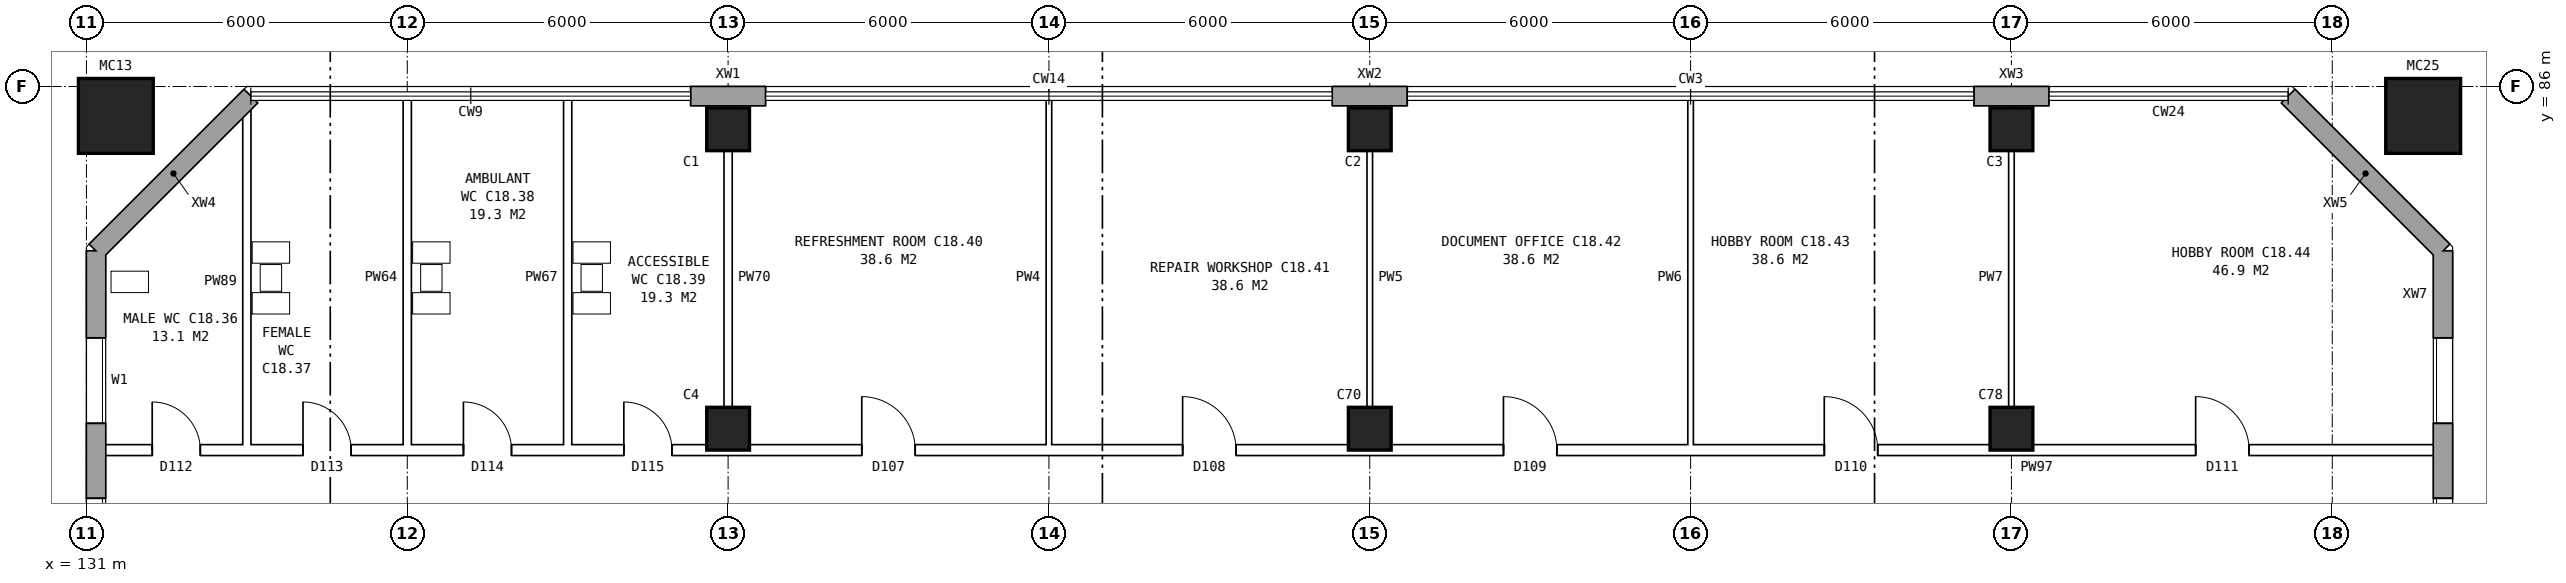
"""IFC4 building model, lengths in metres.
Left out: names, types, materials, properties, quantities, classifications, styles, units other than length and angle.
Written with IfcOpenShell. Run it as: python <this file> out.ifc"""

import sys

from ifc_helpers import new_model, si_unit, direction, frame, frame_2d, origin, origin_2d, place, context, subcontext, project, spatial, rectangle, hollow_rectangle, extrude, element, fill, save


model = new_model("IFC4")
c1 = context("Model", 3, precision=1e-05, world=origin(), true_north=direction((0.0, 1.0)))
c2 = subcontext(c1, "Body", "Model", "MODEL_VIEW")
j1 = project(units=[si_unit("LENGTHUNIT", "METRE"), si_unit("PLANEANGLEUNIT", "RADIAN")], contexts=[c1])
p1 = place(None, origin())
s1 = spatial("IfcSite", under=j1, at=p1, CompositionType="ELEMENT")
p2 = place(p1, origin())
s2 = spatial("IfcBuilding", under=s1, at=p2, CompositionType="ELEMENT")
p3 = place(p2, frame((0.0, 0.0, 67.4)))
s3 = spatial("IfcBuildingStorey", under=s2, at=p3, CompositionType="ELEMENT", Elevation=67.4)
for number, where, z_axis, x_axis in (
    (1, (143.0, 79.6, 0.0), (0.0, 0.0, 1.0), (1.0, 0.0, 0.0)),
    (2, (143.0, 85.2, 0.0), (0.0, 0.0, 1.0), (1.0, 0.0, 0.0)),
    (3, (155.0, 79.6, 0.0), (0.0, 0.0, 1.0), (1.0, 0.0, 0.0)),
    (4, (155.0, 85.2, 0.0), (0.0, 0.0, 1.0), (1.0, 0.0, 0.0)),
    (5, (167.0, 79.6, 0.0), (0.0, 0.0, 1.0), (1.0, 0.0, 0.0)),
    (6, (167.0, 85.2, 0.0), (0.0, 0.0, 1.0), (1.0, 0.0, 0.0)),
):
    element("IfcColumn", number, at=place(p3, frame(where, z_axis=z_axis, x_axis=x_axis)), inside=s3, PredefinedType="COLUMN", context=c2, shape_type="SweptSolid", body=[
        extrude(rectangle(XDim=0.8, YDim=0.8, at=origin_2d()), origin(), (0.0, 0.0, 1.0), 3.6),
    ])
for number, where, z_axis, x_axis in (
    (7, (174.7, 85.45, 0.0), (0.0, 0.0, 1.0), (1.0, 0.0, 0.0)),
    (8, (131.55, 85.45, 0.0), (0.0, 0.0, 1.0), (1.0, 0.0, 0.0)),
):
    element("IfcColumn", number, at=place(p3, frame(where, z_axis=z_axis, x_axis=x_axis)), inside=s3, PredefinedType="COLUMN", context=c2, shape_type="SweptSolid", body=[
        extrude(hollow_rectangle(XDim=1.4, YDim=1.4, WallThickness=0.075, at=origin_2d()), origin(), (0.0, 0.0, 1.0), 4.2),
    ])
p4 = place(p3, frame((175.07, 57.075, 0.0), z_axis=(0.0, 0.0, 1.0), x_axis=(0.0, 1.0, 0.0)))
e9 = element("IfcWall", 9, at=p4, inside=s3, PredefinedType="STANDARD", context=c2, shape_type="SweptSolid", body=[
    extrude(rectangle(XDim=25.851, YDim=0.36, at=frame_2d((12.925, 0.0))), origin(), (0.0, 0.0, 1.0), 3.6),
])
p5 = place(p4, frame((1.625, 0.0, 0.8)))
e10 = element("IfcOpeningElement", 10, at=p5, cuts=e9, PredefinedType="OPENING", context=c2, shape_type="SweptSolid", body=[
    extrude(rectangle(XDim=1.6, YDim=1.8, at=frame_2d((0.8, 0.9))), frame((0.0, 0.19, 0.0), z_axis=(0.0, -1.0, 0.0), x_axis=(1.0, 0.0, 0.0)), (0.0, 0.0, 1.0), 0.38),
])
p6 = place(p4, frame((4.625, 0.0, 0.8)))
e11 = element("IfcOpeningElement", 11, at=p6, cuts=e9, PredefinedType="OPENING", context=c2, shape_type="SweptSolid", body=[
    extrude(rectangle(XDim=1.6, YDim=1.8, at=frame_2d((0.8, 0.9))), frame((0.0, 0.19, 0.0), z_axis=(0.0, -1.0, 0.0), x_axis=(1.0, 0.0, 0.0)), (0.0, 0.0, 1.0), 0.38),
])
p7 = place(p4, frame((7.625, 0.0, 0.8)))
e12 = element("IfcOpeningElement", 12, at=p7, cuts=e9, PredefinedType="OPENING", context=c2, shape_type="SweptSolid", body=[
    extrude(rectangle(XDim=1.6, YDim=1.8, at=frame_2d((0.8, 0.9))), frame((0.0, 0.19, 0.0), z_axis=(0.0, -1.0, 0.0), x_axis=(1.0, 0.0, 0.0)), (0.0, 0.0, 1.0), 0.38),
])
p8 = place(p4, frame((10.625, 0.0, 0.8)))
e13 = element("IfcOpeningElement", 13, at=p8, cuts=e9, PredefinedType="OPENING", context=c2, shape_type="SweptSolid", body=[
    extrude(rectangle(XDim=1.6, YDim=1.8, at=frame_2d((0.8, 0.9))), frame((0.0, 0.19, 0.0), z_axis=(0.0, -1.0, 0.0), x_axis=(1.0, 0.0, 0.0)), (0.0, 0.0, 1.0), 0.38),
])
p9 = place(p4, frame((13.625, 0.0, 0.8)))
e14 = element("IfcOpeningElement", 14, at=p9, cuts=e9, PredefinedType="OPENING", context=c2, shape_type="SweptSolid", body=[
    extrude(rectangle(XDim=1.6, YDim=1.8, at=frame_2d((0.8, 0.9))), frame((0.0, 0.19, 0.0), z_axis=(0.0, -1.0, 0.0), x_axis=(1.0, 0.0, 0.0)), (0.0, 0.0, 1.0), 0.38),
])
p10 = place(p4, frame((16.625, 0.0, 0.8)))
e15 = element("IfcOpeningElement", 15, at=p10, cuts=e9, PredefinedType="OPENING", context=c2, shape_type="SweptSolid", body=[
    extrude(rectangle(XDim=1.6, YDim=1.8, at=frame_2d((0.8, 0.9))), frame((0.0, 0.19, 0.0), z_axis=(0.0, -1.0, 0.0), x_axis=(1.0, 0.0, 0.0)), (0.0, 0.0, 1.0), 0.38),
])
p11 = place(p4, frame((19.625, 0.0, 0.8)))
e16 = element("IfcOpeningElement", 16, at=p11, cuts=e9, PredefinedType="OPENING", context=c2, shape_type="SweptSolid", body=[
    extrude(rectangle(XDim=1.6, YDim=1.8, at=frame_2d((0.8, 0.9))), frame((0.0, 0.19, 0.0), z_axis=(0.0, -1.0, 0.0), x_axis=(1.0, 0.0, 0.0)), (0.0, 0.0, 1.0), 0.38),
])
p12 = place(p4, frame((22.625, 0.0, 0.8)))
e17 = element("IfcOpeningElement", 17, at=p12, cuts=e9, PredefinedType="OPENING", context=c2, shape_type="SweptSolid", body=[
    extrude(rectangle(XDim=1.6, YDim=1.8, at=frame_2d((0.8, 0.9))), frame((0.0, 0.19, 0.0), z_axis=(0.0, -1.0, 0.0), x_axis=(1.0, 0.0, 0.0)), (0.0, 0.0, 1.0), 0.38),
])
p13 = place(p3, frame((175.07, 82.925, 0.0), z_axis=(0.0, 0.0, 1.0), x_axis=(-0.707106781187, 0.707106781187, 0.0)))
e18 = element("IfcWall", 18, at=p13, inside=s3, PredefinedType="STANDARD", context=c2, shape_type="SweptSolid", body=[
    extrude(rectangle(XDim=4.094, YDim=0.36, at=frame_2d((2.047, 0.0))), origin(), (0.0, 0.0, 1.0), 3.6),
])
for number, where, z_axis, x_axis in (
    (19, (167.7, 85.82, 0.0), (0.0, 0.0, 1.0), (-1.0, 0.0, 0.0)),
    (20, (155.7, 85.82, 0.0), (0.0, 0.0, 1.0), (-1.0, 0.0, 0.0)),
    (21, (143.7, 85.82, 0.0), (0.0, 0.0, 1.0), (-1.0, 0.0, 0.0)),
):
    element("IfcWall", number, at=place(p3, frame(where, z_axis=z_axis, x_axis=x_axis)), inside=s3, PredefinedType="STANDARD", context=c2, shape_type="SweptSolid", body=[
        extrude(rectangle(XDim=1.4, YDim=0.36, at=frame_2d((0.7, 0.0))), origin(), (0.0, 0.0, 1.0), 3.6),
    ])
p14 = place(p3, frame((134.075, 85.82, 0.0), z_axis=(0.0, 0.0, 1.0), x_axis=(-0.707106781187, -0.707106781187, 0.0)))
e22 = element("IfcWall", 22, at=p14, inside=s3, PredefinedType="STANDARD", context=c2, shape_type="SweptSolid", body=[
    extrude(rectangle(XDim=4.094, YDim=0.36, at=frame_2d((2.047, 0.0))), origin(), (0.0, 0.0, 1.0), 3.6),
])
p15 = place(p3, frame((131.18, 82.925, 0.0), z_axis=(0.0, 0.0, 1.0), x_axis=(0.0, -1.0, 0.0)))
e23 = element("IfcWall", 23, at=p15, inside=s3, PredefinedType="STANDARD", context=c2, shape_type="SweptSolid", body=[
    extrude(rectangle(XDim=25.851, YDim=0.36, at=frame_2d((12.925, 0.0))), origin(), (0.0, 0.0, 1.0), 3.6),
])
p16 = place(p15, frame((1.625, 0.0, 0.8)))
e24 = element("IfcOpeningElement", 24, at=p16, cuts=e23, PredefinedType="OPENING", context=c2, shape_type="SweptSolid", body=[
    extrude(rectangle(XDim=1.6, YDim=1.8, at=frame_2d((0.8, 0.9))), frame((0.0, 0.19, 0.0), z_axis=(0.0, -1.0, 0.0), x_axis=(1.0, 0.0, 0.0)), (0.0, 0.0, 1.0), 0.38),
])
p17 = place(p15, frame((4.625, 0.0, 0.8)))
e25 = element("IfcOpeningElement", 25, at=p17, cuts=e23, PredefinedType="OPENING", context=c2, shape_type="SweptSolid", body=[
    extrude(rectangle(XDim=1.6, YDim=1.8, at=frame_2d((0.8, 0.9))), frame((0.0, 0.19, 0.0), z_axis=(0.0, -1.0, 0.0), x_axis=(1.0, 0.0, 0.0)), (0.0, 0.0, 1.0), 0.38),
])
p18 = place(p15, frame((19.625, 0.0, 0.8)))
e26 = element("IfcOpeningElement", 26, at=p18, cuts=e23, PredefinedType="OPENING", context=c2, shape_type="SweptSolid", body=[
    extrude(rectangle(XDim=1.6, YDim=1.8, at=frame_2d((0.8, 0.9))), frame((0.0, 0.19, 0.0), z_axis=(0.0, -1.0, 0.0), x_axis=(1.0, 0.0, 0.0)), (0.0, 0.0, 1.0), 0.38),
])
p19 = place(p15, frame((22.625, 0.0, 0.8)))
e27 = element("IfcOpeningElement", 27, at=p19, cuts=e23, PredefinedType="OPENING", context=c2, shape_type="SweptSolid", body=[
    extrude(rectangle(XDim=1.6, YDim=1.8, at=frame_2d((0.8, 0.9))), frame((0.0, 0.19, 0.0), z_axis=(0.0, -1.0, 0.0), x_axis=(1.0, 0.0, 0.0)), (0.0, 0.0, 1.0), 0.38),
])
p20 = place(p3, frame((131.24, 79.2, 0.0), z_axis=(0.0, 0.0, 1.0), x_axis=(1.0, 0.0, 0.0)))
e28 = element("IfcWall", 28, at=p20, inside=s3, PredefinedType="PARTITIONING", context=c2, shape_type="SweptSolid", body=[
    extrude(rectangle(XDim=43.77, YDim=0.2, at=frame_2d((21.885, 0.0))), origin(), (0.0, 0.0, 1.0), 3.6),
])
p21 = place(p20, frame((0.99, 0.0, 0.0)))
e29 = element("IfcOpeningElement", 29, at=p21, cuts=e28, PredefinedType="OPENING", context=c2, shape_type="SweptSolid", body=[
    extrude(rectangle(XDim=0.9, YDim=2.1, at=frame_2d((0.45, 1.05))), frame((0.0, 0.11, 0.0), z_axis=(0.0, -1.0, 0.0), x_axis=(1.0, 0.0, 0.0)), (0.0, 0.0, 1.0), 0.22),
])
p22 = place(p20, frame((3.81, 0.0, 0.0)))
e30 = element("IfcOpeningElement", 30, at=p22, cuts=e28, PredefinedType="OPENING", context=c2, shape_type="SweptSolid", body=[
    extrude(rectangle(XDim=0.9, YDim=2.1, at=frame_2d((0.45, 1.05))), frame((0.0, 0.11, 0.0), z_axis=(0.0, -1.0, 0.0), x_axis=(1.0, 0.0, 0.0)), (0.0, 0.0, 1.0), 0.22),
])
p23 = place(p20, frame((6.81, 0.0, 0.0)))
e31 = element("IfcOpeningElement", 31, at=p23, cuts=e28, PredefinedType="OPENING", context=c2, shape_type="SweptSolid", body=[
    extrude(rectangle(XDim=0.9, YDim=2.1, at=frame_2d((0.45, 1.05))), frame((0.0, 0.11, 0.0), z_axis=(0.0, -1.0, 0.0), x_axis=(1.0, 0.0, 0.0)), (0.0, 0.0, 1.0), 0.22),
])
p24 = place(p20, frame((9.81, 0.0, 0.0)))
e32 = element("IfcOpeningElement", 32, at=p24, cuts=e28, PredefinedType="OPENING", context=c2, shape_type="SweptSolid", body=[
    extrude(rectangle(XDim=0.9, YDim=2.1, at=frame_2d((0.45, 1.05))), frame((0.0, 0.11, 0.0), z_axis=(0.0, -1.0, 0.0), x_axis=(1.0, 0.0, 0.0)), (0.0, 0.0, 1.0), 0.22),
])
p25 = place(p20, frame((14.26, 0.0, 0.0)))
e33 = element("IfcOpeningElement", 33, at=p25, cuts=e28, PredefinedType="OPENING", context=c2, shape_type="SweptSolid", body=[
    extrude(rectangle(XDim=1.0, YDim=2.1, at=frame_2d((0.5, 1.05))), frame((0.0, 0.11, 0.0), z_axis=(0.0, -1.0, 0.0), x_axis=(1.0, 0.0, 0.0)), (0.0, 0.0, 1.0), 0.22),
])
p26 = place(p20, frame((20.26, 0.0, 0.0)))
e34 = element("IfcOpeningElement", 34, at=p26, cuts=e28, PredefinedType="OPENING", context=c2, shape_type="SweptSolid", body=[
    extrude(rectangle(XDim=1.0, YDim=2.1, at=frame_2d((0.5, 1.05))), frame((0.0, 0.11, 0.0), z_axis=(0.0, -1.0, 0.0), x_axis=(1.0, 0.0, 0.0)), (0.0, 0.0, 1.0), 0.22),
])
p27 = place(p20, frame((26.26, 0.0, 0.0)))
e35 = element("IfcOpeningElement", 35, at=p27, cuts=e28, PredefinedType="OPENING", context=c2, shape_type="SweptSolid", body=[
    extrude(rectangle(XDim=1.0, YDim=2.1, at=frame_2d((0.5, 1.05))), frame((0.0, 0.11, 0.0), z_axis=(0.0, -1.0, 0.0), x_axis=(1.0, 0.0, 0.0)), (0.0, 0.0, 1.0), 0.22),
])
p28 = place(p20, frame((32.26, 0.0, 0.0)))
e36 = element("IfcOpeningElement", 36, at=p28, cuts=e28, PredefinedType="OPENING", context=c2, shape_type="SweptSolid", body=[
    extrude(rectangle(XDim=1.0, YDim=2.1, at=frame_2d((0.5, 1.05))), frame((0.0, 0.11, 0.0), z_axis=(0.0, -1.0, 0.0), x_axis=(1.0, 0.0, 0.0)), (0.0, 0.0, 1.0), 0.22),
])
p29 = place(p20, frame((39.205, 0.0, 0.0)))
e37 = element("IfcOpeningElement", 37, at=p29, cuts=e28, PredefinedType="OPENING", context=c2, shape_type="SweptSolid", body=[
    extrude(rectangle(XDim=1.0, YDim=2.1, at=frame_2d((0.5, 1.05))), frame((0.0, 0.11, 0.0), z_axis=(0.0, -1.0, 0.0), x_axis=(1.0, 0.0, 0.0)), (0.0, 0.0, 1.0), 0.22),
])
p30 = place(p3, frame((134.0, 79.1, 0.0), z_axis=(0.0, 0.0, 1.0), x_axis=(0.0, 1.0, 0.0)))
e38 = element("IfcWall", 38, at=p30, inside=s3, PredefinedType="PLUMBINGWALL", context=c2, shape_type="SweptSolid", body=[
    extrude(rectangle(XDim=6.511, YDim=0.15, at=frame_2d((3.255, 0.0))), origin(), (0.0, 0.0, 1.0), 3.6),
])
for number, where, z_axis, x_axis in (
    (39, (137.0, 79.1, 0.0), (0.0, 0.0, 1.0), (0.0, 1.0, 0.0)),
    (40, (140.0, 79.1, 0.0), (0.0, 0.0, 1.0), (0.0, 1.0, 0.0)),
    (41, (143.0, 79.1, 0.0), (0.0, 0.0, 1.0), (0.0, 1.0, 0.0)),
):
    element("IfcWall", number, at=place(p3, frame(where, z_axis=z_axis, x_axis=x_axis)), inside=s3, PredefinedType="PLUMBINGWALL", context=c2, shape_type="SweptSolid", body=[
        extrude(rectangle(XDim=6.66, YDim=0.15, at=frame_2d((3.33, 0.0))), origin(), (0.0, 0.0, 1.0), 3.6),
    ])
for number, where, z_axis, x_axis in (
    (42, (149.0, 79.1, 0.0), (0.0, 0.0, 1.0), (0.0, 1.0, 0.0)),
    (43, (155.0, 79.1, 0.0), (0.0, 0.0, 1.0), (0.0, 1.0, 0.0)),
    (44, (161.0, 79.1, 0.0), (0.0, 0.0, 1.0), (0.0, 1.0, 0.0)),
    (45, (167.0, 79.1, 0.0), (0.0, 0.0, 1.0), (0.0, 1.0, 0.0)),
):
    element("IfcWall", number, at=place(p3, frame(where, z_axis=z_axis, x_axis=x_axis)), inside=s3, PredefinedType="PARTITIONING", context=c2, shape_type="SweptSolid", body=[
        extrude(rectangle(XDim=6.66, YDim=0.1, at=frame_2d((3.33, 0.0))), origin(), (0.0, 0.0, 1.0), 3.6),
    ])
p31 = place(p11, origin())
e46 = element("IfcWindow", 46, at=p31, inside=s3, PartitioningType="SINGLE_PANEL", PredefinedType="WINDOW", context=c2, shape_type="SweptSolid", body=[
    extrude(rectangle(XDim=1.6, YDim=1.8, at=frame_2d((0.8, 0.9))), frame((0.0, 0.15, 0.0), z_axis=(0.0, -1.0, 0.0), x_axis=(1.0, 0.0, 0.0)), (0.0, 0.0, 1.0), 0.06),
])
fill(e16, e46)
p32 = place(p12, origin())
e47 = element("IfcWindow", 47, at=p32, inside=s3, PartitioningType="SINGLE_PANEL", PredefinedType="WINDOW", context=c2, shape_type="SweptSolid", body=[
    extrude(rectangle(XDim=1.6, YDim=1.8, at=frame_2d((0.8, 0.9))), frame((0.0, 0.15, 0.0), z_axis=(0.0, -1.0, 0.0), x_axis=(1.0, 0.0, 0.0)), (0.0, 0.0, 1.0), 0.06),
])
fill(e17, e47)
p33 = place(p16, origin())
e48 = element("IfcWindow", 48, at=p33, inside=s3, PartitioningType="SINGLE_PANEL", PredefinedType="WINDOW", context=c2, shape_type="SweptSolid", body=[
    extrude(rectangle(XDim=1.6, YDim=1.8, at=frame_2d((0.8, 0.9))), frame((0.0, 0.15, 0.0), z_axis=(0.0, -1.0, 0.0), x_axis=(1.0, 0.0, 0.0)), (0.0, 0.0, 1.0), 0.06),
])
fill(e24, e48)
p34 = place(p17, origin())
e49 = element("IfcWindow", 49, at=p34, inside=s3, PartitioningType="SINGLE_PANEL", PredefinedType="WINDOW", context=c2, shape_type="SweptSolid", body=[
    extrude(rectangle(XDim=1.6, YDim=1.8, at=frame_2d((0.8, 0.9))), frame((0.0, 0.15, 0.0), z_axis=(0.0, -1.0, 0.0), x_axis=(1.0, 0.0, 0.0)), (0.0, 0.0, 1.0), 0.06),
])
fill(e25, e49)
p35 = place(p21, origin())
e50 = element("IfcDoor", 50, at=p35, inside=s3, OperationType="SINGLE_SWING_LEFT", PredefinedType="DOOR", context=c2, shape_type="SweptSolid", body=[
    extrude(rectangle(XDim=0.9, YDim=2.1, at=frame_2d((0.45, 1.05))), frame((0.0, 0.025, 0.0), z_axis=(0.0, -1.0, 0.0), x_axis=(1.0, 0.0, 0.0)), (0.0, 0.0, 1.0), 0.05),
])
fill(e29, e50)
p36 = place(p22, origin())
e51 = element("IfcDoor", 51, at=p36, inside=s3, OperationType="SINGLE_SWING_LEFT", PredefinedType="DOOR", context=c2, shape_type="SweptSolid", body=[
    extrude(rectangle(XDim=0.9, YDim=2.1, at=frame_2d((0.45, 1.05))), frame((0.0, 0.025, 0.0), z_axis=(0.0, -1.0, 0.0), x_axis=(1.0, 0.0, 0.0)), (0.0, 0.0, 1.0), 0.05),
])
fill(e30, e51)
p37 = place(p23, origin())
e52 = element("IfcDoor", 52, at=p37, inside=s3, OperationType="SINGLE_SWING_LEFT", PredefinedType="DOOR", context=c2, shape_type="SweptSolid", body=[
    extrude(rectangle(XDim=0.9, YDim=2.1, at=frame_2d((0.45, 1.05))), frame((0.0, 0.025, 0.0), z_axis=(0.0, -1.0, 0.0), x_axis=(1.0, 0.0, 0.0)), (0.0, 0.0, 1.0), 0.05),
])
fill(e31, e52)
p38 = place(p24, origin())
e53 = element("IfcDoor", 53, at=p38, inside=s3, OperationType="SINGLE_SWING_LEFT", PredefinedType="DOOR", context=c2, shape_type="SweptSolid", body=[
    extrude(rectangle(XDim=0.9, YDim=2.1, at=frame_2d((0.45, 1.05))), frame((0.0, 0.025, 0.0), z_axis=(0.0, -1.0, 0.0), x_axis=(1.0, 0.0, 0.0)), (0.0, 0.0, 1.0), 0.05),
])
fill(e32, e53)
p39 = place(p25, origin())
e54 = element("IfcDoor", 54, at=p39, inside=s3, OperationType="SINGLE_SWING_LEFT", PredefinedType="DOOR", context=c2, shape_type="SweptSolid", body=[
    extrude(rectangle(XDim=1.0, YDim=2.1, at=frame_2d((0.5, 1.05))), frame((0.0, 0.025, 0.0), z_axis=(0.0, -1.0, 0.0), x_axis=(1.0, 0.0, 0.0)), (0.0, 0.0, 1.0), 0.05),
])
fill(e33, e54)
p40 = place(p26, origin())
e55 = element("IfcDoor", 55, at=p40, inside=s3, OperationType="SINGLE_SWING_LEFT", PredefinedType="DOOR", context=c2, shape_type="SweptSolid", body=[
    extrude(rectangle(XDim=1.0, YDim=2.1, at=frame_2d((0.5, 1.05))), frame((0.0, 0.025, 0.0), z_axis=(0.0, -1.0, 0.0), x_axis=(1.0, 0.0, 0.0)), (0.0, 0.0, 1.0), 0.05),
])
fill(e34, e55)
p41 = place(p27, origin())
e56 = element("IfcDoor", 56, at=p41, inside=s3, OperationType="SINGLE_SWING_LEFT", PredefinedType="DOOR", context=c2, shape_type="SweptSolid", body=[
    extrude(rectangle(XDim=1.0, YDim=2.1, at=frame_2d((0.5, 1.05))), frame((0.0, 0.025, 0.0), z_axis=(0.0, -1.0, 0.0), x_axis=(1.0, 0.0, 0.0)), (0.0, 0.0, 1.0), 0.05),
])
fill(e35, e56)
p42 = place(p28, origin())
e57 = element("IfcDoor", 57, at=p42, inside=s3, OperationType="SINGLE_SWING_LEFT", PredefinedType="DOOR", context=c2, shape_type="SweptSolid", body=[
    extrude(rectangle(XDim=1.0, YDim=2.1, at=frame_2d((0.5, 1.05))), frame((0.0, 0.025, 0.0), z_axis=(0.0, -1.0, 0.0), x_axis=(1.0, 0.0, 0.0)), (0.0, 0.0, 1.0), 0.05),
])
fill(e36, e57)
p43 = place(p29, origin())
e58 = element("IfcDoor", 58, at=p43, inside=s3, OperationType="SINGLE_SWING_LEFT", PredefinedType="DOOR", context=c2, shape_type="SweptSolid", body=[
    extrude(rectangle(XDim=1.0, YDim=2.1, at=frame_2d((0.5, 1.05))), frame((0.0, 0.025, 0.0), z_axis=(0.0, -1.0, 0.0), x_axis=(1.0, 0.0, 0.0)), (0.0, 0.0, 1.0), 0.05),
])
fill(e37, e58)
save(model, sys.argv[1])
